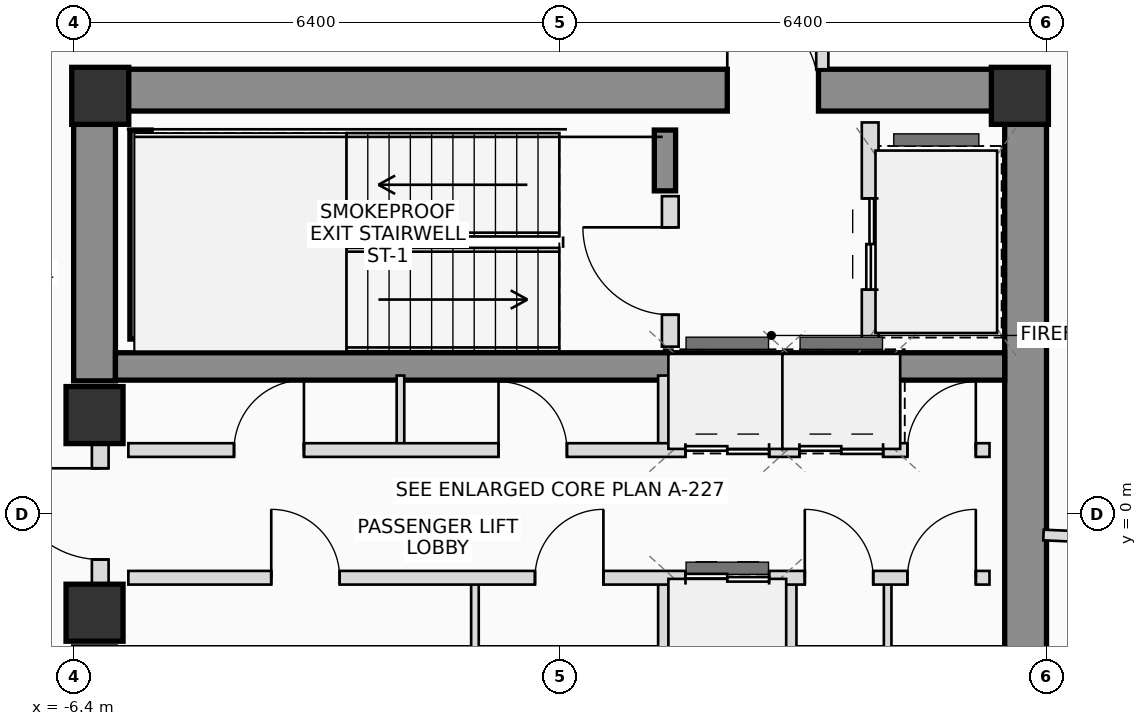
"""IFC4 building model, lengths in metres.
Left out: names, types, materials, properties, quantities, classifications, styles, units other than length and angle.
Written with IfcOpenShell. Run it as: python <this file> out.ifc"""

import sys

from ifc_helpers import new_model, si_unit, direction, frame, frame_2d, origin, origin_2d, place, context, subcontext, project, spatial, rectangle, extrude, source, transform, mapped, element, fill, save


model = new_model("IFC4")
c1 = context("Model", 3, precision=1e-05, world=origin(), true_north=direction((0.0, 1.0)))
c2 = subcontext(c1, "Body", "Model", "MODEL_VIEW")
j1 = project(units=[si_unit("LENGTHUNIT", "METRE"), si_unit("PLANEANGLEUNIT", "RADIAN")], contexts=[c1])
p1 = place(None, origin())
s1 = spatial("IfcSite", under=j1, at=p1, CompositionType="ELEMENT")
p2 = place(p1, origin())
s2 = spatial("IfcBuilding", under=s1, at=p2, CompositionType="ELEMENT")
p3 = place(p2, frame((0.0, 0.0, 289.85)))
s3 = spatial("IfcBuildingStorey", under=s2, at=p3, CompositionType="ELEMENT", Elevation=289.85)
m1 = source(origin(), c2, "Body", "SweptSolid", [
    extrude(rectangle(XDim=0.75, YDim=0.75, at=origin_2d()), origin(), (0.0, 0.0, 1.0), 3.45),
])
for number, where, z_axis, x_axis in (
    (1, (6.05, 5.5, 0.0), (0.0, 0.0, 1.0), (1.0, 0.0, 0.0)),
    (2, (-6.05, 5.5, 0.0), (0.0, 0.0, 1.0), (1.0, 0.0, 0.0)),
):
    element("IfcColumn", number, at=place(p3, frame(where, z_axis=z_axis, x_axis=x_axis)), inside=s3, PredefinedType="COLUMN", context=c2, shape_type="MappedRepresentation", body=[
        mapped(m1, transform((0.0, 0.0, 0.0), scale=1.0)),
    ])
p4 = place(p3, frame((-6.4, 5.575, 0.0), z_axis=(0.0, 0.0, 1.0), x_axis=(1.0, 0.0, 0.0)))
e3 = element("IfcWall", 3, at=p4, inside=s3, PredefinedType="SHEAR", context=c2, shape_type="SweptSolid", body=[
    extrude(rectangle(XDim=12.8, YDim=0.55, at=frame_2d((6.4, 0.0))), origin(), (0.0, 0.0, 1.0), 3.45),
])
p5 = place(p4, frame((8.6, 0.0, 0.0)))
e4 = element("IfcOpeningElement", 4, at=p5, cuts=e3, PredefinedType="OPENING", context=c2, shape_type="SweptSolid", body=[
    extrude(rectangle(XDim=1.2, YDim=2.2, at=frame_2d((0.6, 1.1))), frame((0.0, 0.285, 0.0), z_axis=(0.0, -1.0, 0.0), x_axis=(1.0, 0.0, 0.0)), (0.0, 0.0, 1.0), 0.57),
])
p6 = place(p3, frame((6.125, -5.3, 0.0), z_axis=(0.0, 0.0, 1.0), x_axis=(0.0, 1.0, 0.0)))
e5 = element("IfcWall", 5, at=p6, inside=s3, PredefinedType="SHEAR", context=c2, shape_type="SweptSolid", body=[
    extrude(rectangle(XDim=10.6, YDim=0.55, at=frame_2d((5.3, 0.0))), origin(), (0.0, 0.0, 1.0), 3.45),
])
p7 = place(p3, frame((-6.125, 1.75, 0.0), z_axis=(0.0, 0.0, 1.0), x_axis=(0.0, 1.0, 0.0)))
e6 = element("IfcWall", 6, at=p7, inside=s3, PredefinedType="SHEAR", context=c2, shape_type="SweptSolid", body=[
    extrude(rectangle(XDim=3.55, YDim=0.55, at=frame_2d((1.775, 0.0))), origin(), (0.0, 0.0, 1.0), 3.45),
])
p8 = place(p3, frame((-5.85, 1.94, 0.0), z_axis=(0.0, 0.0, 1.0), x_axis=(1.0, 0.0, 0.0)))
e7 = element("IfcWall", 7, at=p8, inside=s3, PredefinedType="SHEAR", context=c2, shape_type="SweptSolid", body=[
    extrude(rectangle(XDim=11.7, YDim=0.36, at=frame_2d((5.85, 0.0))), origin(), (0.0, 0.0, 1.0), 3.45),
])
p9 = place(p3, frame((-5.52, 2.3, 0.0), z_axis=(0.0, 0.0, 1.0), x_axis=(0.0, 1.0, 0.0)))
e8 = element("IfcWall", 8, at=p9, inside=s3, PredefinedType="SHEAR", context=c2, shape_type="SweptSolid", body=[
    extrude(rectangle(XDim=2.75, YDim=0.28, at=frame_2d((1.375, 0.0))), origin(), (0.0, 0.0, 1.0), 3.45),
])
p10 = place(p3, frame((1.38, 4.25, 0.0), z_axis=(0.0, 0.0, 1.0), x_axis=(0.0, 1.0, 0.0)))
e9 = element("IfcWall", 9, at=p10, inside=s3, PredefinedType="SHEAR", context=c2, shape_type="SweptSolid", body=[
    extrude(rectangle(XDim=0.8, YDim=0.28, at=frame_2d((0.4, 0.0))), origin(), (0.0, 0.0, 1.0), 3.45),
])
for number, where, z_axis, x_axis in (
    (10, (-6.125, -1.3, 0.0), (0.0, 0.0, 1.0), (1.0, 0.0, 0.0)),
    (11, (-6.125, 1.3, 0.0), (0.0, 0.0, 1.0), (1.0, 0.0, 0.0)),
):
    element("IfcColumn", number, at=place(p3, frame(where, z_axis=z_axis, x_axis=x_axis)), inside=s3, PredefinedType="COLUMN", context=c2, shape_type="MappedRepresentation", body=[
        mapped(m1, transform((0.0, 0.0, 0.0), scale=1.0)),
    ])
p11 = place(p3, frame((-6.05, -0.95, 0.0), z_axis=(0.0, 0.0, 1.0), x_axis=(0.0, 1.0, 0.0)))
e12 = element("IfcWall", 12, at=p11, inside=s3, PredefinedType="PLUMBINGWALL", context=c2, shape_type="SweptSolid", body=[
    extrude(rectangle(XDim=1.9, YDim=0.22, at=frame_2d((0.95, 0.0))), origin(), (0.0, 0.0, 1.0), 2.23),
])
p12 = place(p11, frame((0.35, 0.0, 0.0)))
e13 = element("IfcOpeningElement", 13, at=p12, cuts=e12, PredefinedType="OPENING", context=c2, shape_type="SweptSolid", body=[
    extrude(rectangle(XDim=1.2, YDim=2.2, at=frame_2d((0.6, 1.1))), frame((0.0, 0.12, 0.0), z_axis=(0.0, -1.0, 0.0), x_axis=(1.0, 0.0, 0.0)), (0.0, 0.0, 1.0), 0.24),
])
p13 = place(p3, frame((1.45, 2.2, 0.0), z_axis=(0.0, 0.0, 1.0), x_axis=(0.0, 1.0, 0.0)))
e14 = element("IfcWall", 14, at=p13, inside=s3, PredefinedType="PLUMBINGWALL", context=c2, shape_type="SweptSolid", body=[
    extrude(rectangle(XDim=1.98, YDim=0.22, at=frame_2d((0.99, 0.0))), origin(), (0.0, 0.0, 1.0), 3.25),
])
p14 = place(p13, frame((0.42, 0.0, 0.0)))
e15 = element("IfcOpeningElement", 15, at=p14, cuts=e14, PredefinedType="OPENING", context=c2, shape_type="SweptSolid", body=[
    extrude(rectangle(XDim=1.15, YDim=2.15, at=frame_2d((0.575, 1.075))), frame((0.0, 0.12, 0.0), z_axis=(0.0, -1.0, 0.0), x_axis=(1.0, 0.0, 0.0)), (0.0, 0.0, 1.0), 0.24),
])
p15 = place(p3, frame((4.08, 2.2, 0.0), z_axis=(0.0, 0.0, 1.0), x_axis=(0.0, 1.0, 0.0)))
e16 = element("IfcWall", 16, at=p15, inside=s3, PredefinedType="PLUMBINGWALL", context=c2, shape_type="SweptSolid", body=[
    extrude(rectangle(XDim=2.95, YDim=0.22, at=frame_2d((1.475, 0.0))), origin(), (0.0, 0.0, 1.0), 3.25),
])
p16 = place(p15, frame((0.75, 0.0, 0.0)))
e17 = element("IfcOpeningElement", 17, at=p16, cuts=e16, PredefinedType="OPENING", context=c2, shape_type="SweptSolid", body=[
    extrude(rectangle(XDim=1.2, YDim=2.25, at=frame_2d((0.6, 1.125))), frame((0.0, 0.12, 0.0), z_axis=(0.0, -1.0, 0.0), x_axis=(1.0, 0.0, 0.0)), (0.0, 0.0, 1.0), 0.24),
])
for number, where, z_axis, x_axis in (
    (18, (-2.1, 0.84, 0.0), (0.0, 0.0, 1.0), (0.0, 1.0, 0.0)),
    (19, (-1.12, -1.82, 0.0), (0.0, 0.0, 1.0), (0.0, 1.0, 0.0)),
):
    element("IfcWall", number, at=place(p3, frame(where, z_axis=z_axis, x_axis=x_axis)), inside=s3, PredefinedType="PARTITIONING", context=c2, shape_type="SweptSolid", body=[
        extrude(rectangle(XDim=0.98, YDim=0.1, at=frame_2d((0.49, 0.0))), origin(), (0.0, 0.0, 1.0), 3.25),
    ])
for number, where, z_axis, x_axis in (
    (20, (1.38, 0.84, 0.0), (0.0, 0.0, 1.0), (0.0, 1.0, 0.0)),
    (21, (1.38, -1.82, 0.0), (0.0, 0.0, 1.0), (0.0, 1.0, 0.0)),
    (22, (3.02, 0.84, 0.0), (0.0, 0.0, 1.0), (0.0, 1.0, 0.0)),
    (23, (4.38, 0.84, 0.0), (0.0, 0.0, 1.0), (0.0, 1.0, 0.0)),
    (24, (3.02, -1.82, 0.0), (0.0, 0.0, 1.0), (0.0, 1.0, 0.0)),
):
    element("IfcWall", number, at=place(p3, frame(where, z_axis=z_axis, x_axis=x_axis)), inside=s3, PredefinedType="PLUMBINGWALL", context=c2, shape_type="SweptSolid", body=[
        extrude(rectangle(XDim=0.98, YDim=0.18, at=frame_2d((0.49, 0.0))), origin(), (0.0, 0.0, 1.0), 3.25),
    ])
p17 = place(p3, frame((4.31, -1.82, 0.0), z_axis=(0.0, 0.0, 1.0), x_axis=(0.0, 1.0, 0.0)))
e25 = element("IfcWall", 25, at=p17, inside=s3, PredefinedType="PARTITIONING", context=c2, shape_type="SweptSolid", body=[
    extrude(rectangle(XDim=0.98, YDim=0.1, at=frame_2d((0.49, 0.0))), origin(), (0.0, 0.0, 1.0), 3.25),
])
p18 = place(p3, frame((-5.68, 0.84, 0.0), z_axis=(0.0, 0.0, 1.0), x_axis=(1.0, 0.0, 0.0)))
e26 = element("IfcWall", 26, at=p18, inside=s3, PredefinedType="PLUMBINGWALL", context=c2, shape_type="SweptSolid", body=[
    extrude(rectangle(XDim=11.33, YDim=0.18, at=frame_2d((5.665, 0.0))), origin(), (0.0, 0.0, 1.0), 3.25),
])
p19 = place(p18, frame((1.39, 0.0, 0.0)))
e27 = element("IfcOpeningElement", 27, at=p19, cuts=e26, PredefinedType="OPENING", context=c2, shape_type="SweptSolid", body=[
    extrude(rectangle(XDim=0.92, YDim=2.1, at=frame_2d((0.46, 1.05))), frame((0.0, 0.1, 0.0), z_axis=(0.0, -1.0, 0.0), x_axis=(1.0, 0.0, 0.0)), (0.0, 0.0, 1.0), 0.2),
])
p20 = place(p18, frame((4.87, 0.0, 0.0)))
e28 = element("IfcOpeningElement", 28, at=p20, cuts=e26, PredefinedType="OPENING", context=c2, shape_type="SweptSolid", body=[
    extrude(rectangle(XDim=0.9, YDim=2.05, at=frame_2d((0.45, 1.025))), frame((0.0, 0.1, 0.0), z_axis=(0.0, -1.0, 0.0), x_axis=(1.0, 0.0, 0.0)), (0.0, 0.0, 1.0), 0.2),
])
p21 = place(p18, frame((7.33, 0.0, 0.0)))
e29 = element("IfcOpeningElement", 29, at=p21, cuts=e26, PredefinedType="OPENING", context=c2, shape_type="SweptSolid", body=[
    extrude(rectangle(XDim=1.1, YDim=2.2, at=frame_2d((0.55, 1.1))), frame((0.0, 0.1, 0.0), z_axis=(0.0, -1.0, 0.0), x_axis=(1.0, 0.0, 0.0)), (0.0, 0.0, 1.0), 0.2),
])
p22 = place(p18, frame((8.83, 0.0, 0.0)))
e30 = element("IfcOpeningElement", 30, at=p22, cuts=e26, PredefinedType="OPENING", context=c2, shape_type="SweptSolid", body=[
    extrude(rectangle(XDim=1.1, YDim=2.2, at=frame_2d((0.55, 1.1))), frame((0.0, 0.1, 0.0), z_axis=(0.0, -1.0, 0.0), x_axis=(1.0, 0.0, 0.0)), (0.0, 0.0, 1.0), 0.2),
])
p23 = place(p18, frame((10.25, 0.0, 0.0)))
e31 = element("IfcOpeningElement", 31, at=p23, cuts=e26, PredefinedType="OPENING", context=c2, shape_type="SweptSolid", body=[
    extrude(rectangle(XDim=0.9, YDim=2.05, at=frame_2d((0.45, 1.025))), frame((0.0, 0.1, 0.0), z_axis=(0.0, -1.0, 0.0), x_axis=(1.0, 0.0, 0.0)), (0.0, 0.0, 1.0), 0.2),
])
p24 = place(p3, frame((-5.68, -0.84, 0.0), z_axis=(0.0, 0.0, 1.0), x_axis=(1.0, 0.0, 0.0)))
e32 = element("IfcWall", 32, at=p24, inside=s3, PredefinedType="PLUMBINGWALL", context=c2, shape_type="SweptSolid", body=[
    extrude(rectangle(XDim=11.33, YDim=0.18, at=frame_2d((5.665, 0.0))), origin(), (0.0, 0.0, 1.0), 3.25),
])
p25 = place(p24, frame((1.88, 0.0, 0.0)))
e33 = element("IfcOpeningElement", 33, at=p25, cuts=e32, PredefinedType="OPENING", context=c2, shape_type="SweptSolid", body=[
    extrude(rectangle(XDim=0.9, YDim=2.05, at=frame_2d((0.45, 1.025))), frame((0.0, 0.1, 0.0), z_axis=(0.0, -1.0, 0.0), x_axis=(1.0, 0.0, 0.0)), (0.0, 0.0, 1.0), 0.2),
])
p26 = place(p24, frame((5.35, 0.0, 0.0)))
e34 = element("IfcOpeningElement", 34, at=p26, cuts=e32, PredefinedType="OPENING", context=c2, shape_type="SweptSolid", body=[
    extrude(rectangle(XDim=0.9, YDim=2.05, at=frame_2d((0.45, 1.025))), frame((0.0, 0.1, 0.0), z_axis=(0.0, -1.0, 0.0), x_axis=(1.0, 0.0, 0.0)), (0.0, 0.0, 1.0), 0.2),
])
p27 = place(p24, frame((7.33, 0.0, 0.0)))
e35 = element("IfcOpeningElement", 35, at=p27, cuts=e32, PredefinedType="OPENING", context=c2, shape_type="SweptSolid", body=[
    extrude(rectangle(XDim=1.1, YDim=2.2, at=frame_2d((0.55, 1.1))), frame((0.0, 0.1, 0.0), z_axis=(0.0, -1.0, 0.0), x_axis=(1.0, 0.0, 0.0)), (0.0, 0.0, 1.0), 0.2),
])
p28 = place(p24, frame((8.9, 0.0, 0.0)))
e36 = element("IfcOpeningElement", 36, at=p28, cuts=e32, PredefinedType="OPENING", context=c2, shape_type="SweptSolid", body=[
    extrude(rectangle(XDim=0.9, YDim=2.05, at=frame_2d((0.45, 1.025))), frame((0.0, 0.1, 0.0), z_axis=(0.0, -1.0, 0.0), x_axis=(1.0, 0.0, 0.0)), (0.0, 0.0, 1.0), 0.2),
])
p29 = place(p24, frame((10.25, 0.0, 0.0)))
e37 = element("IfcOpeningElement", 37, at=p29, cuts=e32, PredefinedType="OPENING", context=c2, shape_type="SweptSolid", body=[
    extrude(rectangle(XDim=0.9, YDim=2.05, at=frame_2d((0.45, 1.025))), frame((0.0, 0.1, 0.0), z_axis=(0.0, -1.0, 0.0), x_axis=(1.0, 0.0, 0.0)), (0.0, 0.0, 1.0), 0.2),
])
p30 = place(p3, frame((3.45, 7.425, 0.0), z_axis=(0.0, 0.0, 1.0), x_axis=(0.0, -1.0, 0.0)))
e38 = element("IfcWall", 38, at=p30, inside=s3, PredefinedType="PARTITIONING", context=c2, shape_type="SweptSolid", body=[
    extrude(rectangle(XDim=1.575, YDim=0.16, at=frame_2d((0.787, 0.0))), origin(), (0.0, 0.0, 1.0), 2.855),
])
p31 = place(p30, frame((0.287, 0.0, 0.0)))
e39 = element("IfcOpeningElement", 39, at=p31, cuts=e38, PredefinedType="OPENING", context=c2, shape_type="SweptSolid", body=[
    extrude(rectangle(XDim=1.0, YDim=2.25, at=frame_2d((0.5, 1.125))), frame((0.0, 0.09, 0.0), z_axis=(0.0, -1.0, 0.0), x_axis=(1.0, 0.0, 0.0)), (0.0, 0.0, 1.0), 0.18),
])
p32 = place(p3, frame((6.36, -0.278, 0.0), z_axis=(0.0, 0.0, 1.0), x_axis=(0.999047623791, -0.043633076864, 0.0)))
e40 = element("IfcWall", 40, at=p32, inside=s3, PredefinedType="PARTITIONING", context=c2, shape_type="SweptSolid", body=[
    extrude(rectangle(XDim=13.524, YDim=0.14, at=frame_2d((6.762, 0.0))), origin(), (0.0, 0.0, 1.0), 2.815),
])
p33 = place(p5, origin())
e41 = element("IfcDoor", 41, at=p33, inside=s3, OperationType="SINGLE_SWING_LEFT", PredefinedType="DOOR", context=c2, shape_type="SweptSolid", body=[
    extrude(rectangle(XDim=1.2, YDim=2.2, at=frame_2d((0.6, 1.1))), frame((0.0, 0.025, 0.0), z_axis=(0.0, -1.0, 0.0), x_axis=(1.0, 0.0, 0.0)), (0.0, 0.0, 1.0), 0.05),
])
fill(e4, e41)
p34 = place(p12, origin())
e42 = element("IfcDoor", 42, at=p34, inside=s3, OperationType="SINGLE_SWING_RIGHT", PredefinedType="DOOR", context=c2, shape_type="SweptSolid", body=[
    extrude(rectangle(XDim=1.2, YDim=2.2, at=frame_2d((0.6, 1.1))), frame((0.0, 0.025, 0.0), z_axis=(0.0, -1.0, 0.0), x_axis=(1.0, 0.0, 0.0)), (0.0, 0.0, 1.0), 0.05),
])
fill(e13, e42)
p35 = place(p14, origin())
e43 = element("IfcDoor", 43, at=p35, inside=s3, OperationType="SINGLE_SWING_RIGHT", PredefinedType="DOOR", context=c2, shape_type="SweptSolid", body=[
    extrude(rectangle(XDim=1.15, YDim=2.15, at=frame_2d((0.575, 1.075))), frame((0.0, 0.025, 0.0), z_axis=(0.0, -1.0, 0.0), x_axis=(1.0, 0.0, 0.0)), (0.0, 0.0, 1.0), 0.05),
])
fill(e15, e43)
p36 = place(p16, origin())
e44 = element("IfcDoor", 44, at=p36, inside=s3, OperationType="DOUBLE_DOOR_SLIDING", PredefinedType="DOOR", context=c2, shape_type="SweptSolid", body=[
    extrude(rectangle(XDim=1.2, YDim=2.25, at=frame_2d((0.6, 1.125))), frame((0.0, 0.025, 0.0), z_axis=(0.0, -1.0, 0.0), x_axis=(1.0, 0.0, 0.0)), (0.0, 0.0, 1.0), 0.05),
])
fill(e17, e44)
p37 = place(p19, origin())
e45 = element("IfcDoor", 45, at=p37, inside=s3, OperationType="SINGLE_SWING_RIGHT", PredefinedType="DOOR", context=c2, shape_type="SweptSolid", body=[
    extrude(rectangle(XDim=0.92, YDim=2.1, at=frame_2d((0.46, 1.05))), frame((0.0, 0.025, 0.0), z_axis=(0.0, -1.0, 0.0), x_axis=(1.0, 0.0, 0.0)), (0.0, 0.0, 1.0), 0.05),
])
fill(e27, e45)
p38 = place(p20, origin())
e46 = element("IfcDoor", 46, at=p38, inside=s3, OperationType="SINGLE_SWING_LEFT", PredefinedType="DOOR", context=c2, shape_type="SweptSolid", body=[
    extrude(rectangle(XDim=0.9, YDim=2.05, at=frame_2d((0.45, 1.025))), frame((0.0, 0.025, 0.0), z_axis=(0.0, -1.0, 0.0), x_axis=(1.0, 0.0, 0.0)), (0.0, 0.0, 1.0), 0.05),
])
fill(e28, e46)
p39 = place(p21, origin())
e47 = element("IfcDoor", 47, at=p39, inside=s3, OperationType="DOUBLE_DOOR_SLIDING", PredefinedType="DOOR", context=c2, shape_type="SweptSolid", body=[
    extrude(rectangle(XDim=1.1, YDim=2.2, at=frame_2d((0.55, 1.1))), frame((0.0, 0.025, 0.0), z_axis=(0.0, -1.0, 0.0), x_axis=(1.0, 0.0, 0.0)), (0.0, 0.0, 1.0), 0.05),
])
fill(e29, e47)
p40 = place(p22, origin())
e48 = element("IfcDoor", 48, at=p40, inside=s3, OperationType="DOUBLE_DOOR_SLIDING", PredefinedType="DOOR", context=c2, shape_type="SweptSolid", body=[
    extrude(rectangle(XDim=1.1, YDim=2.2, at=frame_2d((0.55, 1.1))), frame((0.0, 0.025, 0.0), z_axis=(0.0, -1.0, 0.0), x_axis=(1.0, 0.0, 0.0)), (0.0, 0.0, 1.0), 0.05),
])
fill(e30, e48)
p41 = place(p23, origin())
e49 = element("IfcDoor", 49, at=p41, inside=s3, OperationType="SINGLE_SWING_RIGHT", PredefinedType="DOOR", context=c2, shape_type="SweptSolid", body=[
    extrude(rectangle(XDim=0.9, YDim=2.05, at=frame_2d((0.45, 1.025))), frame((0.0, 0.025, 0.0), z_axis=(0.0, -1.0, 0.0), x_axis=(1.0, 0.0, 0.0)), (0.0, 0.0, 1.0), 0.05),
])
fill(e31, e49)
p42 = place(p25, origin())
e50 = element("IfcDoor", 50, at=p42, inside=s3, OperationType="SINGLE_SWING_LEFT", PredefinedType="DOOR", context=c2, shape_type="SweptSolid", body=[
    extrude(rectangle(XDim=0.9, YDim=2.05, at=frame_2d((0.45, 1.025))), frame((0.0, 0.025, 0.0), z_axis=(0.0, -1.0, 0.0), x_axis=(1.0, 0.0, 0.0)), (0.0, 0.0, 1.0), 0.05),
])
fill(e33, e50)
p43 = place(p26, origin())
e51 = element("IfcDoor", 51, at=p43, inside=s3, OperationType="SINGLE_SWING_RIGHT", PredefinedType="DOOR", context=c2, shape_type="SweptSolid", body=[
    extrude(rectangle(XDim=0.9, YDim=2.05, at=frame_2d((0.45, 1.025))), frame((0.0, 0.025, 0.0), z_axis=(0.0, -1.0, 0.0), x_axis=(1.0, 0.0, 0.0)), (0.0, 0.0, 1.0), 0.05),
])
fill(e34, e51)
p44 = place(p27, origin())
e52 = element("IfcDoor", 52, at=p44, inside=s3, OperationType="DOUBLE_DOOR_SLIDING", PredefinedType="DOOR", context=c2, shape_type="SweptSolid", body=[
    extrude(rectangle(XDim=1.1, YDim=2.2, at=frame_2d((0.55, 1.1))), frame((0.0, 0.025, 0.0), z_axis=(0.0, -1.0, 0.0), x_axis=(1.0, 0.0, 0.0)), (0.0, 0.0, 1.0), 0.05),
])
fill(e35, e52)
p45 = place(p28, origin())
e53 = element("IfcDoor", 53, at=p45, inside=s3, OperationType="SINGLE_SWING_LEFT", PredefinedType="DOOR", context=c2, shape_type="SweptSolid", body=[
    extrude(rectangle(XDim=0.9, YDim=2.05, at=frame_2d((0.45, 1.025))), frame((0.0, 0.025, 0.0), z_axis=(0.0, -1.0, 0.0), x_axis=(1.0, 0.0, 0.0)), (0.0, 0.0, 1.0), 0.05),
])
fill(e36, e53)
p46 = place(p29, origin())
e54 = element("IfcDoor", 54, at=p46, inside=s3, OperationType="SINGLE_SWING_RIGHT", PredefinedType="DOOR", context=c2, shape_type="SweptSolid", body=[
    extrude(rectangle(XDim=0.9, YDim=2.05, at=frame_2d((0.45, 1.025))), frame((0.0, 0.025, 0.0), z_axis=(0.0, -1.0, 0.0), x_axis=(1.0, 0.0, 0.0)), (0.0, 0.0, 1.0), 0.05),
])
fill(e37, e54)
save(model, sys.argv[1])
